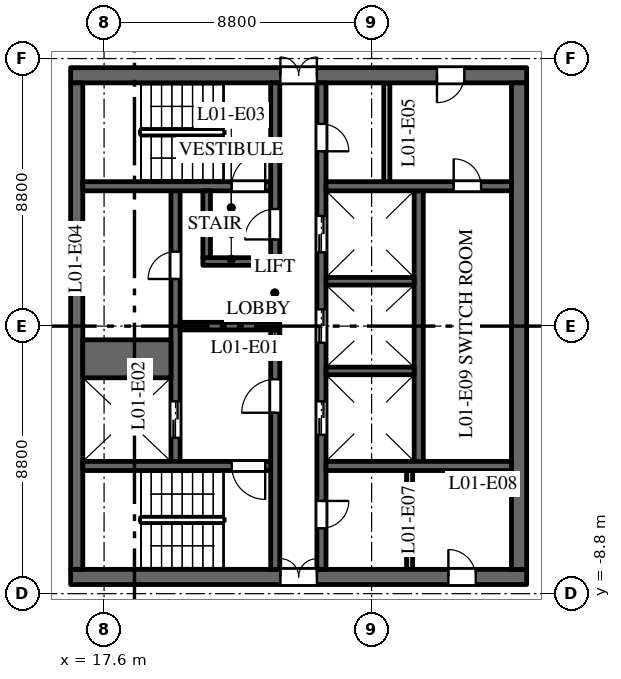
"""IFC4 building model, lengths in metres.
Left out: names, types, materials, properties, quantities, classifications, styles, units other than length and angle.
Written with IfcOpenShell. Run it as: python <this file> out.ifc"""

import sys

from ifc_helpers import new_model, si_unit, direction, frame, frame_2d, origin, place, context, subcontext, project, spatial, rectangle, extrude, element, fill, save


model = new_model("IFC4")
c1 = context("Model", 3, precision=1e-05, world=origin(), true_north=direction((0.0, 1.0)))
c2 = subcontext(c1, "Body", "Model", "MODEL_VIEW")
j1 = project(units=[si_unit("LENGTHUNIT", "METRE"), si_unit("PLANEANGLEUNIT", "RADIAN")], contexts=[c1])
p1 = place(None, origin())
s1 = spatial("IfcSite", under=j1, at=p1, CompositionType="ELEMENT")
p2 = place(p1, origin())
s2 = spatial("IfcBuilding", under=s1, at=p2, CompositionType="ELEMENT")
p3 = place(p2, frame((0.0, 0.0, 7.5)))
s3 = spatial("IfcBuildingStorey", under=s2, at=p3, CompositionType="ELEMENT", Elevation=7.5)
p4 = place(p3, frame((16.5, 8.25, 0.0), z_axis=(0.0, 0.0, 1.0), x_axis=(1.0, 0.0, 0.0)))
e1 = element("IfcWall", 1, at=p4, inside=s3, PredefinedType="SHEAR", context=c2, shape_type="SweptSolid", body=[
    extrude(rectangle(XDim=15.0, YDim=0.5, at=frame_2d((7.5, 0.0))), origin(), (0.0, 0.0, 1.0), 5.75),
])
p5 = place(p4, frame((6.9, 0.0, 0.0)))
e2 = element("IfcOpeningElement", 2, at=p5, cuts=e1, PredefinedType="OPENING", context=c2, shape_type="SweptSolid", body=[
    extrude(rectangle(XDim=1.2, YDim=2.1, at=frame_2d((0.6, 1.05))), frame((0.0, 0.26, 0.0), z_axis=(0.0, -1.0, 0.0), x_axis=(1.0, 0.0, 0.0)), (0.0, 0.0, 1.0), 0.52),
])
p6 = place(p4, frame((12.05, 0.0, 0.0)))
e3 = element("IfcOpeningElement", 3, at=p6, cuts=e1, PredefinedType="OPENING", context=c2, shape_type="SweptSolid", body=[
    extrude(rectangle(XDim=0.9, YDim=2.1, at=frame_2d((0.45, 1.05))), frame((0.0, 0.26, 0.0), z_axis=(0.0, -1.0, 0.0), x_axis=(1.0, 0.0, 0.0)), (0.0, 0.0, 1.0), 0.52),
])
p7 = place(p3, frame((16.5, -8.25, 0.0), z_axis=(0.0, 0.0, 1.0), x_axis=(1.0, 0.0, 0.0)))
e4 = element("IfcWall", 4, at=p7, inside=s3, PredefinedType="SHEAR", context=c2, shape_type="SweptSolid", body=[
    extrude(rectangle(XDim=15.0, YDim=0.5, at=frame_2d((7.5, 0.0))), origin(), (0.0, 0.0, 1.0), 5.75),
])
p8 = place(p7, frame((6.9, 0.0, 0.0)))
e5 = element("IfcOpeningElement", 5, at=p8, cuts=e4, PredefinedType="OPENING", context=c2, shape_type="SweptSolid", body=[
    extrude(rectangle(XDim=1.2, YDim=2.1, at=frame_2d((0.6, 1.05))), frame((0.0, 0.26, 0.0), z_axis=(0.0, -1.0, 0.0), x_axis=(1.0, 0.0, 0.0)), (0.0, 0.0, 1.0), 0.52),
])
p9 = place(p7, frame((12.425, 0.0, 0.0)))
e6 = element("IfcOpeningElement", 6, at=p9, cuts=e4, PredefinedType="OPENING", context=c2, shape_type="SweptSolid", body=[
    extrude(rectangle(XDim=0.9, YDim=2.1, at=frame_2d((0.45, 1.05))), frame((0.0, 0.26, 0.0), z_axis=(0.0, -1.0, 0.0), x_axis=(1.0, 0.0, 0.0)), (0.0, 0.0, 1.0), 0.52),
])
p10 = place(p3, frame((27.95, -4.45, 0.0), z_axis=(0.0, 0.0, 1.0), x_axis=(0.0, 1.0, 0.0)))
e7 = element("IfcWall", 7, at=p10, inside=s3, PredefinedType="SHEAR", context=c2, shape_type="SweptSolid", body=[
    extrude(rectangle(XDim=8.9, YDim=0.3, at=frame_2d((4.45, 0.0))), origin(), (0.0, 0.0, 1.0), 5.75),
])
p11 = place(p3, frame((19.95, -4.45, 0.0), z_axis=(0.0, 0.0, 1.0), x_axis=(0.0, 1.0, 0.0)))
e8 = element("IfcWall", 8, at=p11, inside=s3, PredefinedType="SHEAR", context=c2, shape_type="SweptSolid", body=[
    extrude(rectangle(XDim=8.9, YDim=0.3, at=frame_2d((4.45, 0.0))), origin(), (0.0, 0.0, 1.0), 5.75),
])
p12 = place(p11, frame((0.775, 0.0, 0.0)))
e9 = element("IfcOpeningElement", 9, at=p12, cuts=e8, PredefinedType="OPENING", context=c2, shape_type="SweptSolid", body=[
    extrude(rectangle(XDim=1.2, YDim=2.1, at=frame_2d((0.6, 1.05))), frame((0.0, 0.16, 0.0), z_axis=(0.0, -1.0, 0.0), x_axis=(1.0, 0.0, 0.0)), (0.0, 0.0, 1.0), 0.32),
])
p13 = place(p11, frame((6.0, 0.0, 0.0)))
e10 = element("IfcOpeningElement", 10, at=p13, cuts=e8, PredefinedType="OPENING", context=c2, shape_type="SweptSolid", body=[
    extrude(rectangle(XDim=0.9, YDim=2.1, at=frame_2d((0.45, 1.05))), frame((0.0, 0.16, 0.0), z_axis=(0.0, -1.0, 0.0), x_axis=(1.0, 0.0, 0.0)), (0.0, 0.0, 1.0), 0.32),
])
p14 = place(p3, frame((24.75, -8.0, 0.0), z_axis=(0.0, 0.0, 1.0), x_axis=(0.0, 1.0, 0.0)))
e11 = element("IfcWall", 11, at=p14, inside=s3, PredefinedType="SHEAR", context=c2, shape_type="SweptSolid", body=[
    extrude(rectangle(XDim=16.0, YDim=0.3, at=frame_2d((8.0, 0.0))), origin(), (0.0, 0.0, 1.0), 5.75),
])
p15 = place(p14, frame((4.425, 0.0, 0.0)))
e12 = element("IfcOpeningElement", 12, at=p15, cuts=e11, PredefinedType="OPENING", context=c2, shape_type="SweptSolid", body=[
    extrude(rectangle(XDim=1.1, YDim=2.1, at=frame_2d((0.55, 1.05))), frame((0.0, 0.16, 0.0), z_axis=(0.0, -1.0, 0.0), x_axis=(1.0, 0.0, 0.0)), (0.0, 0.0, 1.0), 0.32),
])
p16 = place(p14, frame((7.45, 0.0, 0.0)))
e13 = element("IfcOpeningElement", 13, at=p16, cuts=e11, PredefinedType="OPENING", context=c2, shape_type="SweptSolid", body=[
    extrude(rectangle(XDim=1.1, YDim=2.1, at=frame_2d((0.55, 1.05))), frame((0.0, 0.16, 0.0), z_axis=(0.0, -1.0, 0.0), x_axis=(1.0, 0.0, 0.0)), (0.0, 0.0, 1.0), 0.32),
])
p17 = place(p14, frame((10.425, 0.0, 0.0)))
e14 = element("IfcOpeningElement", 14, at=p17, cuts=e11, PredefinedType="OPENING", context=c2, shape_type="SweptSolid", body=[
    extrude(rectangle(XDim=1.2, YDim=2.1, at=frame_2d((0.6, 1.05))), frame((0.0, 0.16, 0.0), z_axis=(0.0, -1.0, 0.0), x_axis=(1.0, 0.0, 0.0)), (0.0, 0.0, 1.0), 0.32),
])
p18 = place(p14, frame((13.75, 0.0, 0.0)))
e15 = element("IfcOpeningElement", 15, at=p18, cuts=e11, PredefinedType="OPENING", context=c2, shape_type="SweptSolid", body=[
    extrude(rectangle(XDim=0.9, YDim=2.1, at=frame_2d((0.45, 1.05))), frame((0.0, 0.16, 0.0), z_axis=(0.0, -1.0, 0.0), x_axis=(1.0, 0.0, 0.0)), (0.0, 0.0, 1.0), 0.32),
])
p19 = place(p14, frame((1.35, 0.0, 0.0)))
e16 = element("IfcOpeningElement", 16, at=p19, cuts=e11, PredefinedType="OPENING", context=c2, shape_type="SweptSolid", body=[
    extrude(rectangle(XDim=0.9, YDim=2.1, at=frame_2d((0.45, 1.05))), frame((0.0, 0.16, 0.0), z_axis=(0.0, -1.0, 0.0), x_axis=(1.0, 0.0, 0.0)), (0.0, 0.0, 1.0), 0.32),
])
p20 = place(p3, frame((20.1, 0.0, 0.0), z_axis=(0.0, 0.0, 1.0), x_axis=(1.0, 0.0, 0.0)))
e17 = element("IfcWall", 17, at=p20, inside=s3, PredefinedType="SHEAR", context=c2, shape_type="SweptSolid", body=[
    extrude(rectangle(XDim=3.28, YDim=0.25, at=frame_2d((1.64, 0.0))), origin(), (0.0, 0.0, 1.0), 5.75),
])
p21 = place(p3, frame((16.7, -8.0, 0.0), z_axis=(0.0, 0.0, 1.0), x_axis=(0.0, 1.0, 0.0)))
e18 = element("IfcWall", 18, at=p21, inside=s3, PredefinedType="SHEAR", context=c2, shape_type="SweptSolid", body=[
    extrude(rectangle(XDim=16.0, YDim=0.4, at=frame_2d((8.0, 0.0))), origin(), (0.0, 0.0, 1.0), 5.75),
])
p22 = place(p3, frame((31.25, -8.0, 0.0), z_axis=(0.0, 0.0, 1.0), x_axis=(0.0, 1.0, 0.0)))
e19 = element("IfcWall", 19, at=p22, inside=s3, PredefinedType="SHEAR", context=c2, shape_type="SweptSolid", body=[
    extrude(rectangle(XDim=16.0, YDim=0.5, at=frame_2d((8.0, 0.0))), origin(), (0.0, 0.0, 1.0), 5.75),
])
p23 = place(p3, frame((24.9, 4.6, 0.0), z_axis=(0.0, 0.0, 1.0), x_axis=(1.0, 0.0, 0.0)))
e20 = element("IfcWall", 20, at=p23, inside=s3, PredefinedType="SHEAR", context=c2, shape_type="SweptSolid", body=[
    extrude(rectangle(XDim=6.1, YDim=0.3, at=frame_2d((3.05, 0.0))), origin(), (0.0, 0.0, 1.0), 5.75),
])
p24 = place(p23, frame((4.2, 0.0, 0.0)))
e21 = element("IfcOpeningElement", 21, at=p24, cuts=e20, PredefinedType="OPENING", context=c2, shape_type="SweptSolid", body=[
    extrude(rectangle(XDim=0.9, YDim=2.1, at=frame_2d((0.45, 1.05))), frame((0.0, 0.16, 0.0), z_axis=(0.0, -1.0, 0.0), x_axis=(1.0, 0.0, 0.0)), (0.0, 0.0, 1.0), 0.32),
])
for number, where, z_axis, x_axis in (
    (22, (26.9, 4.75, 0.0), (0.0, 0.0, 1.0), (0.0, 1.0, 0.0)),
    (23, (27.65, -8.0, 0.0), (0.0, 0.0, 1.0), (0.0, 1.0, 0.0)),
):
    element("IfcWall", number, at=place(p3, frame(where, z_axis=z_axis, x_axis=x_axis)), inside=s3, PredefinedType="PARTITIONING", context=c2, shape_type="SweptSolid", body=[
        extrude(rectangle(XDim=3.25, YDim=0.2, at=frame_2d((1.625, 0.0))), origin(), (0.0, 0.0, 1.0), 5.75),
    ])
p25 = place(p3, frame((24.9, -4.6, 0.0), z_axis=(0.0, 0.0, 1.0), x_axis=(1.0, 0.0, 0.0)))
e24 = element("IfcWall", 24, at=p25, inside=s3, PredefinedType="SHEAR", context=c2, shape_type="SweptSolid", body=[
    extrude(rectangle(XDim=6.1, YDim=0.3, at=frame_2d((3.05, 0.0))), origin(), (0.0, 0.0, 1.0), 5.75),
])
p26 = place(p3, frame((16.9, -1.075, 0.0), z_axis=(0.0, 0.0, 1.0), x_axis=(1.0, 0.0, 0.0)))
e25 = element("IfcWall", 25, at=p26, inside=s3, PredefinedType="SHEAR", context=c2, shape_type="SweptSolid", body=[
    extrude(rectangle(XDim=2.9, YDim=1.25, at=frame_2d((1.45, 0.0))), origin(), (0.0, 0.0, 1.0), 5.75),
])
for number, where, z_axis, x_axis in (
    (26, (24.9, -1.475, 0.0), (0.0, 0.0, 1.0), (1.0, 0.0, 0.0)),
    (27, (24.9, 1.475, 0.0), (0.0, 0.0, 1.0), (1.0, 0.0, 0.0)),
):
    element("IfcWall", number, at=place(p3, frame(where, z_axis=z_axis, x_axis=x_axis)), inside=s3, PredefinedType="SHEAR", context=c2, shape_type="SweptSolid", body=[
        extrude(rectangle(XDim=2.9, YDim=0.25, at=frame_2d((1.45, 0.0))), origin(), (0.0, 0.0, 1.0), 5.75),
    ])
p27 = place(p3, frame((23.23, 2.25, 0.0), z_axis=(0.0, 0.0, 1.0), x_axis=(0.0, 1.0, 0.0)))
e28 = element("IfcWall", 28, at=p27, inside=s3, PredefinedType="SHEAR", context=c2, shape_type="SweptSolid", body=[
    extrude(rectangle(XDim=5.75, YDim=0.3, at=frame_2d((2.875, 0.0))), origin(), (0.0, 0.0, 1.0), 5.75),
])
p28 = place(p27, frame((0.6, 0.0, 0.0)))
e29 = element("IfcOpeningElement", 29, at=p28, cuts=e28, PredefinedType="OPENING", context=c2, shape_type="SweptSolid", body=[
    extrude(rectangle(XDim=1.0, YDim=2.1, at=frame_2d((0.5, 1.05))), frame((0.0, 0.16, 0.0), z_axis=(0.0, -1.0, 0.0), x_axis=(1.0, 0.0, 0.0)), (0.0, 0.0, 1.0), 0.32),
])
p29 = place(p3, frame((23.23, -8.0, 0.0), z_axis=(0.0, 0.0, 1.0), x_axis=(0.0, 1.0, 0.0)))
e30 = element("IfcWall", 30, at=p29, inside=s3, PredefinedType="SHEAR", context=c2, shape_type="SweptSolid", body=[
    extrude(rectangle(XDim=7.875, YDim=0.3, at=frame_2d((3.938, 0.0))), origin(), (0.0, 0.0, 1.0), 5.75),
])
p30 = place(p29, frame((5.15, 0.0, 0.0)))
e31 = element("IfcOpeningElement", 31, at=p30, cuts=e30, PredefinedType="OPENING", context=c2, shape_type="SweptSolid", body=[
    extrude(rectangle(XDim=1.1, YDim=2.1, at=frame_2d((0.55, 1.05))), frame((0.0, 0.16, 0.0), z_axis=(0.0, -1.0, 0.0), x_axis=(1.0, 0.0, 0.0)), (0.0, 0.0, 1.0), 0.32),
])
p31 = place(p3, frame((16.9, 4.6, 0.0), z_axis=(0.0, 0.0, 1.0), x_axis=(1.0, 0.0, 0.0)))
e32 = element("IfcWall", 32, at=p31, inside=s3, PredefinedType="SHEAR", context=c2, shape_type="SweptSolid", body=[
    extrude(rectangle(XDim=6.18, YDim=0.3, at=frame_2d((3.09, 0.0))), origin(), (0.0, 0.0, 1.0), 5.75),
])
p32 = place(p31, frame((4.9, 0.0, 0.0)))
e33 = element("IfcOpeningElement", 33, at=p32, cuts=e32, PredefinedType="OPENING", context=c2, shape_type="SweptSolid", body=[
    extrude(rectangle(XDim=1.1, YDim=2.1, at=frame_2d((0.55, 1.05))), frame((0.0, 0.16, 0.0), z_axis=(0.0, -1.0, 0.0), x_axis=(1.0, 0.0, 0.0)), (0.0, 0.0, 1.0), 0.32),
])
p33 = place(p3, frame((16.9, -4.6, 0.0), z_axis=(0.0, 0.0, 1.0), x_axis=(1.0, 0.0, 0.0)))
e34 = element("IfcWall", 34, at=p33, inside=s3, PredefinedType="SHEAR", context=c2, shape_type="SweptSolid", body=[
    extrude(rectangle(XDim=6.18, YDim=0.3, at=frame_2d((3.09, 0.0))), origin(), (0.0, 0.0, 1.0), 5.75),
])
p34 = place(p33, frame((4.9, 0.0, 0.0)))
e35 = element("IfcOpeningElement", 35, at=p34, cuts=e34, PredefinedType="OPENING", context=c2, shape_type="SweptSolid", body=[
    extrude(rectangle(XDim=1.1, YDim=2.1, at=frame_2d((0.55, 1.05))), frame((0.0, 0.16, 0.0), z_axis=(0.0, -1.0, 0.0), x_axis=(1.0, 0.0, 0.0)), (0.0, 0.0, 1.0), 0.32),
])
p35 = place(p3, frame((20.85, 2.125, 0.0), z_axis=(0.0, 0.0, 1.0), x_axis=(1.0, 0.0, 0.0)))
e36 = element("IfcWall", 36, at=p35, inside=s3, PredefinedType="SHEAR", context=c2, shape_type="SweptSolid", body=[
    extrude(rectangle(XDim=2.53, YDim=0.25, at=frame_2d((1.265, 0.0))), origin(), (0.0, 0.0, 1.0), 5.75),
])
p36 = place(p3, frame((20.975, 2.25, 0.0), z_axis=(0.0, 0.0, 1.0), x_axis=(0.0, 1.0, 0.0)))
e37 = element("IfcWall", 37, at=p36, inside=s3, PredefinedType="SHEAR", context=c2, shape_type="SweptSolid", body=[
    extrude(rectangle(XDim=2.2, YDim=0.25, at=frame_2d((1.1, 0.0))), origin(), (0.0, 0.0, 1.0), 5.75),
])
p37 = place(p12, origin())
e38 = element("IfcDoor", 38, at=p37, inside=s3, OperationType="DOUBLE_DOOR_SLIDING", PredefinedType="DOOR", context=c2, shape_type="SweptSolid", body=[
    extrude(rectangle(XDim=1.2, YDim=2.1, at=frame_2d((0.6, 1.05))), frame((0.0, 0.025, 0.0), z_axis=(0.0, -1.0, 0.0), x_axis=(1.0, 0.0, 0.0)), (0.0, 0.0, 1.0), 0.05),
])
fill(e9, e38)
p38 = place(p15, origin())
e39 = element("IfcDoor", 39, at=p38, inside=s3, OperationType="DOUBLE_DOOR_SLIDING", PredefinedType="DOOR", context=c2, shape_type="SweptSolid", body=[
    extrude(rectangle(XDim=1.1, YDim=2.1, at=frame_2d((0.55, 1.05))), frame((0.0, 0.025, 0.0), z_axis=(0.0, -1.0, 0.0), x_axis=(1.0, 0.0, 0.0)), (0.0, 0.0, 1.0), 0.05),
])
fill(e12, e39)
p39 = place(p16, origin())
e40 = element("IfcDoor", 40, at=p39, inside=s3, OperationType="DOUBLE_DOOR_SLIDING", PredefinedType="DOOR", context=c2, shape_type="SweptSolid", body=[
    extrude(rectangle(XDim=1.1, YDim=2.1, at=frame_2d((0.55, 1.05))), frame((0.0, 0.025, 0.0), z_axis=(0.0, -1.0, 0.0), x_axis=(1.0, 0.0, 0.0)), (0.0, 0.0, 1.0), 0.05),
])
fill(e13, e40)
p40 = place(p17, origin())
e41 = element("IfcDoor", 41, at=p40, inside=s3, OperationType="DOUBLE_DOOR_SLIDING", PredefinedType="DOOR", context=c2, shape_type="SweptSolid", body=[
    extrude(rectangle(XDim=1.2, YDim=2.1, at=frame_2d((0.6, 1.05))), frame((0.0, 0.025, 0.0), z_axis=(0.0, -1.0, 0.0), x_axis=(1.0, 0.0, 0.0)), (0.0, 0.0, 1.0), 0.05),
])
fill(e14, e41)
p41 = place(p32, origin())
e42 = element("IfcDoor", 42, at=p41, inside=s3, OperationType="SINGLE_SWING_LEFT", PredefinedType="DOOR", context=c2, shape_type="SweptSolid", body=[
    extrude(rectangle(XDim=1.1, YDim=2.1, at=frame_2d((0.55, 1.05))), frame((0.0, 0.025, 0.0), z_axis=(0.0, -1.0, 0.0), x_axis=(1.0, 0.0, 0.0)), (0.0, 0.0, 1.0), 0.05),
])
fill(e33, e42)
p42 = place(p34, origin())
e43 = element("IfcDoor", 43, at=p42, inside=s3, OperationType="SINGLE_SWING_RIGHT", PredefinedType="DOOR", context=c2, shape_type="SweptSolid", body=[
    extrude(rectangle(XDim=1.1, YDim=2.1, at=frame_2d((0.55, 1.05))), frame((0.0, 0.025, 0.0), z_axis=(0.0, -1.0, 0.0), x_axis=(1.0, 0.0, 0.0)), (0.0, 0.0, 1.0), 0.05),
])
fill(e35, e43)
p43 = place(p30, origin())
e44 = element("IfcDoor", 44, at=p43, inside=s3, OperationType="SINGLE_SWING_RIGHT", PredefinedType="DOOR", context=c2, shape_type="SweptSolid", body=[
    extrude(rectangle(XDim=1.1, YDim=2.1, at=frame_2d((0.55, 1.05))), frame((0.0, 0.025, 0.0), z_axis=(0.0, -1.0, 0.0), x_axis=(1.0, 0.0, 0.0)), (0.0, 0.0, 1.0), 0.05),
])
fill(e31, e44)
p44 = place(p28, origin())
e45 = element("IfcDoor", 45, at=p44, inside=s3, OperationType="SINGLE_SWING_RIGHT", PredefinedType="DOOR", context=c2, shape_type="SweptSolid", body=[
    extrude(rectangle(XDim=1.0, YDim=2.1, at=frame_2d((0.5, 1.05))), frame((0.0, 0.025, 0.0), z_axis=(0.0, -1.0, 0.0), x_axis=(1.0, 0.0, 0.0)), (0.0, 0.0, 1.0), 0.05),
])
fill(e29, e45)
p45 = place(p5, origin())
e46 = element("IfcDoor", 46, at=p45, inside=s3, OperationType="DOUBLE_DOOR_DOUBLE_SWING", PredefinedType="DOOR", context=c2, shape_type="SweptSolid", body=[
    extrude(rectangle(XDim=1.2, YDim=2.1, at=frame_2d((0.6, 1.05))), frame((0.0, 0.025, 0.0), z_axis=(0.0, -1.0, 0.0), x_axis=(1.0, 0.0, 0.0)), (0.0, 0.0, 1.0), 0.05),
])
fill(e2, e46)
p46 = place(p8, origin())
e47 = element("IfcDoor", 47, at=p46, inside=s3, OperationType="DOUBLE_DOOR_DOUBLE_SWING", PredefinedType="DOOR", context=c2, shape_type="SweptSolid", body=[
    extrude(rectangle(XDim=1.2, YDim=2.1, at=frame_2d((0.6, 1.05))), frame((0.0, 0.025, 0.0), z_axis=(0.0, -1.0, 0.0), x_axis=(1.0, 0.0, 0.0)), (0.0, 0.0, 1.0), 0.05),
])
fill(e5, e47)
p47 = place(p13, origin())
e48 = element("IfcDoor", 48, at=p47, inside=s3, OperationType="SINGLE_SWING_RIGHT", PredefinedType="DOOR", context=c2, shape_type="SweptSolid", body=[
    extrude(rectangle(XDim=0.9, YDim=2.1, at=frame_2d((0.45, 1.05))), frame((0.0, 0.025, 0.0), z_axis=(0.0, -1.0, 0.0), x_axis=(1.0, 0.0, 0.0)), (0.0, 0.0, 1.0), 0.05),
])
fill(e10, e48)
p48 = place(p18, origin())
e49 = element("IfcDoor", 49, at=p48, inside=s3, OperationType="SINGLE_SWING_LEFT", PredefinedType="DOOR", context=c2, shape_type="SweptSolid", body=[
    extrude(rectangle(XDim=0.9, YDim=2.1, at=frame_2d((0.45, 1.05))), frame((0.0, 0.025, 0.0), z_axis=(0.0, -1.0, 0.0), x_axis=(1.0, 0.0, 0.0)), (0.0, 0.0, 1.0), 0.05),
])
fill(e15, e49)
p49 = place(p6, origin())
e50 = element("IfcDoor", 50, at=p49, inside=s3, OperationType="SINGLE_SWING_LEFT", PredefinedType="DOOR", context=c2, shape_type="SweptSolid", body=[
    extrude(rectangle(XDim=0.9, YDim=2.1, at=frame_2d((0.45, 1.05))), frame((0.0, 0.025, 0.0), z_axis=(0.0, -1.0, 0.0), x_axis=(1.0, 0.0, 0.0)), (0.0, 0.0, 1.0), 0.05),
])
fill(e3, e50)
p50 = place(p19, origin())
e51 = element("IfcDoor", 51, at=p50, inside=s3, OperationType="SINGLE_SWING_RIGHT", PredefinedType="DOOR", context=c2, shape_type="SweptSolid", body=[
    extrude(rectangle(XDim=0.9, YDim=2.1, at=frame_2d((0.45, 1.05))), frame((0.0, 0.025, 0.0), z_axis=(0.0, -1.0, 0.0), x_axis=(1.0, 0.0, 0.0)), (0.0, 0.0, 1.0), 0.05),
])
fill(e16, e51)
p51 = place(p9, origin())
e52 = element("IfcDoor", 52, at=p51, inside=s3, OperationType="SINGLE_SWING_RIGHT", PredefinedType="DOOR", context=c2, shape_type="SweptSolid", body=[
    extrude(rectangle(XDim=0.9, YDim=2.1, at=frame_2d((0.45, 1.05))), frame((0.0, 0.025, 0.0), z_axis=(0.0, -1.0, 0.0), x_axis=(1.0, 0.0, 0.0)), (0.0, 0.0, 1.0), 0.05),
])
fill(e6, e52)
p52 = place(p24, origin())
e53 = element("IfcDoor", 53, at=p52, inside=s3, OperationType="SINGLE_SWING_RIGHT", PredefinedType="DOOR", context=c2, shape_type="SweptSolid", body=[
    extrude(rectangle(XDim=0.9, YDim=2.1, at=frame_2d((0.45, 1.05))), frame((0.0, 0.025, 0.0), z_axis=(0.0, -1.0, 0.0), x_axis=(1.0, 0.0, 0.0)), (0.0, 0.0, 1.0), 0.05),
])
fill(e21, e53)
save(model, sys.argv[1])
